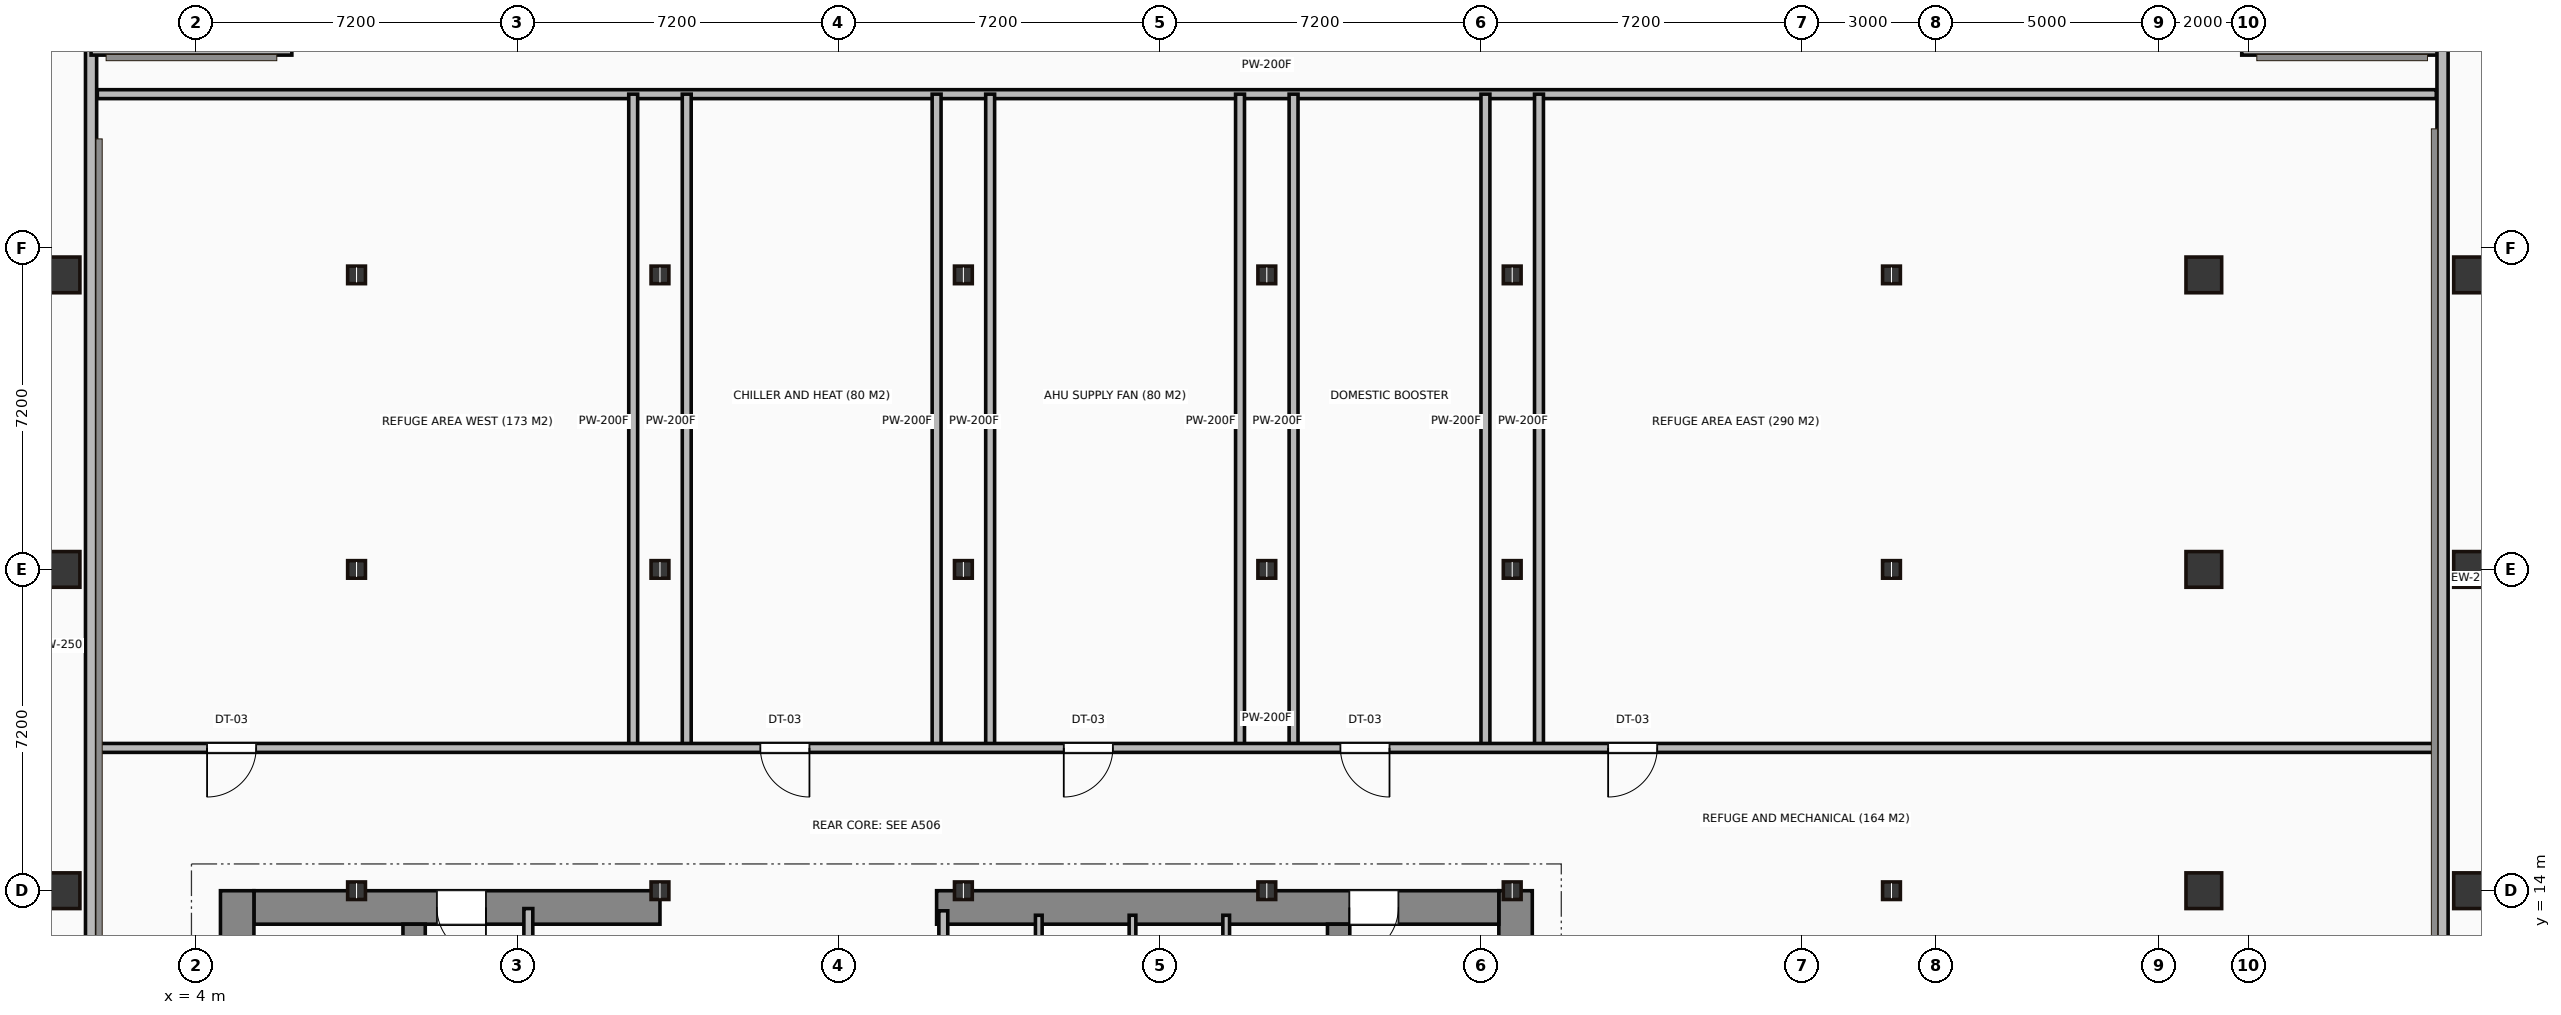
"""IFC4 building model, lengths in metres.
Left out: names, types, materials, properties, quantities, classifications, styles, units other than length and angle.
Written with IfcOpenShell. Run it as: python <this file> out.ifc"""

import sys

from ifc_helpers import new_model, si_unit, direction, frame, frame_2d, origin, origin_2d, place, context, subcontext, project, spatial, rectangle, hollow_rectangle, i_section, extrude, source, transform, mapped, element, fill, save


model = new_model("IFC4")
c1 = context("Model", 3, precision=1e-05, world=origin(), true_north=direction((0.0, 1.0)))
c2 = subcontext(c1, "Body", "Model", "MODEL_VIEW")
j1 = project(units=[si_unit("LENGTHUNIT", "METRE"), si_unit("PLANEANGLEUNIT", "RADIAN")], contexts=[c1])
p1 = place(None, origin())
s1 = spatial("IfcSite", under=j1, at=p1, CompositionType="ELEMENT")
p2 = place(p1, origin())
s2 = spatial("IfcBuilding", under=s1, at=p2, CompositionType="ELEMENT")
p3 = place(p2, frame((0.0, 0.0, 136.1)))
s3 = spatial("IfcBuildingStorey", under=s2, at=p3, CompositionType="ELEMENT", Elevation=136.1)
m1 = source(origin(), c2, "Body", "SweptSolid", [
    extrude(rectangle(XDim=13.1, YDim=0.75, at=frame_2d((6.55, 0.0))), origin(), (0.0, 0.0, 1.0), 4.5),
])
for number, where, z_axis, x_axis in (
    (1, (4.925, 0.9, 0.0), (0.0, 0.0, 1.0), (0.0, 1.0, 0.0)),
    (2, (33.575, 0.9, 0.0), (0.0, 0.0, 1.0), (0.0, 1.0, 0.0)),
):
    element("IfcWall", number, at=place(p3, frame(where, z_axis=z_axis, x_axis=x_axis)), inside=s3, PredefinedType="SHEAR", context=c2, shape_type="MappedRepresentation", body=[
        mapped(m1, transform((0.0, 0.0, 0.0))),
    ])
m2 = source(origin(), c2, "Body", "SweptSolid", [
    extrude(rectangle(XDim=9.1, YDim=0.75, at=frame_2d((4.55, 0.0))), origin(), (0.0, 0.0, 1.0), 4.5),
])
p4 = place(p3, frame((5.3, 13.625, 0.0), z_axis=(0.0, 0.0, 1.0), x_axis=(1.0, 0.0, 0.0)))
e3 = element("IfcWall", 3, at=p4, inside=s3, PredefinedType="SHEAR", context=c2, shape_type="MappedRepresentation", body=[
    mapped(m2, transform((0.0, 0.0, 0.0))),
])
p5 = place(p4, frame((4.1, 0.0, 0.0)))
e4 = element("IfcOpeningElement", 4, at=p5, cuts=e3, PredefinedType="OPENING", context=c2, shape_type="SweptSolid", body=[
    extrude(rectangle(XDim=1.1, YDim=2.15, at=frame_2d((0.55, 1.075))), frame((0.0, 0.385, 0.0), z_axis=(0.0, -1.0, 0.0), x_axis=(1.0, 0.0, 0.0)), (0.0, 0.0, 1.0), 0.77),
])
m3 = source(origin(), c2, "Body", "SweptSolid", [
    extrude(rectangle(XDim=12.6, YDim=0.75, at=frame_2d((6.3, 0.0))), origin(), (0.0, 0.0, 1.0), 4.5),
])
p6 = place(p3, frame((20.6, 13.625, 0.0), z_axis=(0.0, 0.0, 1.0), x_axis=(1.0, 0.0, 0.0)))
e5 = element("IfcWall", 5, at=p6, inside=s3, PredefinedType="SHEAR", context=c2, shape_type="MappedRepresentation", body=[
    mapped(m3, transform((0.0, 0.0, 0.0))),
])
p7 = place(p6, frame((9.25, 0.0, 0.0)))
e6 = element("IfcOpeningElement", 6, at=p7, cuts=e5, PredefinedType="OPENING", context=c2, shape_type="SweptSolid", body=[
    extrude(rectangle(XDim=1.1, YDim=2.15, at=frame_2d((0.55, 1.075))), frame((0.0, 0.385, 0.0), z_axis=(0.0, -1.0, 0.0), x_axis=(1.0, 0.0, 0.0)), (0.0, 0.0, 1.0), 0.77),
])
m4 = source(origin(), c2, "Body", "SweptSolid", [
    extrude(rectangle(XDim=12.35, YDim=0.5, at=frame_2d((6.175, 0.0))), origin(), (0.0, 0.0, 1.0), 4.5),
])
for number, where, z_axis, x_axis in (
    (7, (8.89, 0.9, 0.0), (0.0, 0.0, 1.0), (0.0, 1.0, 0.0)),
    (8, (29.61, 0.9, 0.0), (0.0, 0.0, 1.0), (0.0, 1.0, 0.0)),
):
    element("IfcWall", number, at=place(p3, frame(where, z_axis=z_axis, x_axis=x_axis)), inside=s3, PredefinedType="SHEAR", context=c2, shape_type="MappedRepresentation", body=[
        mapped(m4, transform((0.0, 0.0, 0.0))),
    ])
m5 = source(origin(), c2, "Body", "SweptSolid", [
    extrude(hollow_rectangle(XDim=0.8, YDim=0.8, WallThickness=0.04, at=origin_2d()), origin(), (0.0, 0.0, 1.0), 4.5),
])
for number, where, z_axis, x_axis in (
    (9, (1.0, 14.0, 0.0), (0.0, 0.0, 1.0), (1.0, 0.0, 0.0)),
    (10, (1.0, 21.2, 0.0), (0.0, 0.0, 1.0), (1.0, 0.0, 0.0)),
    (11, (1.0, 27.8, 0.0), (0.0, 0.0, 1.0), (1.0, 0.0, 0.0)),
):
    element("IfcColumn", number, at=place(p3, frame(where, z_axis=z_axis, x_axis=x_axis)), inside=s3, PredefinedType="COLUMN", context=c2, shape_type="MappedRepresentation", body=[
        mapped(m5, transform((0.0, 0.0, 0.0))),
    ])
m6 = source(origin(), c2, "Body", "SweptSolid", [
    extrude(i_section(OverallWidth=0.399, OverallDepth=0.393, WebThickness=0.023, FlangeThickness=0.037, at=origin_2d()), origin(), (0.0, 0.0, 1.0), 4.5),
])
for number, where, z_axis, x_axis in (
    (12, (7.6, 14.0, 0.0), (0.0, 0.0, 1.0), (1.0, 0.0, 0.0)),
    (13, (7.6, 21.2, 0.0), (0.0, 0.0, 1.0), (1.0, 0.0, 0.0)),
    (14, (7.6, 27.8, 0.0), (0.0, 0.0, 1.0), (1.0, 0.0, 0.0)),
    (15, (14.4, 14.0, 0.0), (0.0, 0.0, 1.0), (1.0, 0.0, 0.0)),
    (16, (14.4, 21.2, 0.0), (0.0, 0.0, 1.0), (1.0, 0.0, 0.0)),
    (17, (14.4, 27.8, 0.0), (0.0, 0.0, 1.0), (1.0, 0.0, 0.0)),
    (18, (21.2, 14.0, 0.0), (0.0, 0.0, 1.0), (1.0, 0.0, 0.0)),
    (19, (21.2, 21.2, 0.0), (0.0, 0.0, 1.0), (1.0, 0.0, 0.0)),
    (20, (21.2, 27.8, 0.0), (0.0, 0.0, 1.0), (1.0, 0.0, 0.0)),
    (21, (28.0, 14.0, 0.0), (0.0, 0.0, 1.0), (1.0, 0.0, 0.0)),
    (22, (28.0, 21.2, 0.0), (0.0, 0.0, 1.0), (1.0, 0.0, 0.0)),
    (23, (28.0, 27.8, 0.0), (0.0, 0.0, 1.0), (1.0, 0.0, 0.0)),
    (24, (33.5, 14.0, 0.0), (0.0, 0.0, 1.0), (1.0, 0.0, 0.0)),
    (25, (33.5, 21.2, 0.0), (0.0, 0.0, 1.0), (1.0, 0.0, 0.0)),
    (26, (33.5, 27.8, 0.0), (0.0, 0.0, 1.0), (1.0, 0.0, 0.0)),
    (27, (42.0, 14.0, 0.0), (0.0, 0.0, 1.0), (1.0, 0.0, 0.0)),
    (28, (42.0, 21.2, 0.0), (0.0, 0.0, 1.0), (1.0, 0.0, 0.0)),
    (29, (42.0, 27.8, 0.0), (0.0, 0.0, 1.0), (1.0, 0.0, 0.0)),
):
    element("IfcColumn", number, at=place(p3, frame(where, z_axis=z_axis, x_axis=x_axis)), inside=s3, PredefinedType="COLUMN", context=c2, shape_type="MappedRepresentation", body=[
        mapped(m6, transform((0.0, 0.0, 0.0))),
    ])
for number, where, z_axis, x_axis in (
    (30, (49.0, 14.0, 0.0), (0.0, 0.0, 1.0), (1.0, 0.0, 0.0)),
    (31, (49.0, 21.2, 0.0), (0.0, 0.0, 1.0), (1.0, 0.0, 0.0)),
    (32, (49.0, 27.8, 0.0), (0.0, 0.0, 1.0), (1.0, 0.0, 0.0)),
    (33, (55.0, 14.0, 0.0), (0.0, 0.0, 1.0), (1.0, 0.0, 0.0)),
    (34, (55.0, 21.2, 0.0), (0.0, 0.0, 1.0), (1.0, 0.0, 0.0)),
    (35, (55.0, 27.8, 0.0), (0.0, 0.0, 1.0), (1.0, 0.0, 0.0)),
):
    element("IfcColumn", number, at=place(p3, frame(where, z_axis=z_axis, x_axis=x_axis)), inside=s3, PredefinedType="COLUMN", context=c2, shape_type="MappedRepresentation", body=[
        mapped(m5, transform((0.0, 0.0, 0.0))),
    ])
m7 = source(origin(), c2, "Body", "SweptSolid", [
    extrude(rectangle(XDim=26.7, YDim=0.25, at=frame_2d((13.35, 0.0))), origin(), (0.0, 0.0, 1.0), 4.25),
])
p8 = place(p3, frame((1.65, 6.15, 0.0), z_axis=(0.0, 0.0, 1.0), x_axis=(0.0, 1.0, 0.0)))
e36 = element("IfcWall", 36, at=p8, inside=s3, PredefinedType="STANDARD", context=c2, shape_type="MappedRepresentation", body=[
    mapped(m7, transform((0.0, 0.0, 0.0))),
])
m8 = source(origin(), c2, "Body", "SweptSolid", [
    extrude(rectangle(XDim=4.5, YDim=0.25, at=frame_2d((2.25, 0.0))), origin(), (0.0, 0.0, 1.0), 4.25),
])
for number, where, z_axis, x_axis in (
    (37, (1.65, 32.85, 0.0), (0.0, 0.0, 1.0), (1.0, 0.0, 0.0)),
    (38, (49.85, 32.85, 0.0), (0.0, 0.0, 1.0), (1.0, 0.0, 0.0)),
):
    element("IfcWall", number, at=place(p3, frame(where, z_axis=z_axis, x_axis=x_axis)), inside=s3, PredefinedType="STANDARD", context=c2, shape_type="MappedRepresentation", body=[
        mapped(m8, transform((0.0, 0.0, 0.0))),
    ])
m9 = source(origin(), c2, "Body", "SweptSolid", [
    extrude(rectangle(XDim=23.7, YDim=0.25, at=frame_2d((11.85, 0.0))), origin(), (0.0, 0.0, 1.0), 4.25),
])
p9 = place(p3, frame((54.35, 32.85, 0.0), z_axis=(0.0, 0.0, 1.0), x_axis=(0.0, -1.0, 0.0)))
e39 = element("IfcWall", 39, at=p9, inside=s3, PredefinedType="STANDARD", context=c2, shape_type="MappedRepresentation", body=[
    mapped(m9, transform((0.0, 0.0, 0.0))),
])
m10 = source(origin(), c2, "Body", "SweptSolid", [
    extrude(rectangle(XDim=3.18, YDim=0.2, at=frame_2d((1.59, 0.0))), origin(), (0.0, 0.0, 1.0), 4.25),
])
p10 = place(p3, frame((11.45, 10.42, 0.0), z_axis=(0.0, 0.0, 1.0), x_axis=(0.0, 1.0, 0.0)))
e40 = element("IfcWall", 40, at=p10, inside=s3, PredefinedType="PARTITIONING", context=c2, shape_type="MappedRepresentation", body=[
    mapped(m10, transform((0.0, 0.0, 0.0))),
])
m11 = source(origin(), c2, "Body", "SweptSolid", [
    extrude(rectangle(XDim=3.0, YDim=0.2, at=frame_2d((1.5, 0.0))), origin(), (0.0, 0.0, 1.0), 4.25),
])
p11 = place(p3, frame((20.75, 10.55, 0.0), z_axis=(0.0, 0.0, 1.0), x_axis=(0.0, 1.0, 0.0)))
e41 = element("IfcWall", 41, at=p11, inside=s3, PredefinedType="PARTITIONING", context=c2, shape_type="MappedRepresentation", body=[
    mapped(m11, transform((0.0, 0.0, 0.0))),
])
m12 = source(origin(), c2, "Body", "SweptSolid", [
    extrude(rectangle(XDim=2.85, YDim=0.15, at=frame_2d((1.425, 0.0))), origin(), (0.0, 0.0, 1.0), 4.25),
])
for number, where, z_axis, x_axis in (
    (42, (22.89, 10.6, 0.0), (0.0, 0.0, 1.0), (0.0, 1.0, 0.0)),
    (43, (24.99, 10.6, 0.0), (0.0, 0.0, 1.0), (0.0, 1.0, 0.0)),
    (44, (27.09, 10.6, 0.0), (0.0, 0.0, 1.0), (0.0, 1.0, 0.0)),
):
    element("IfcWall", number, at=place(p3, frame(where, z_axis=z_axis, x_axis=x_axis)), inside=s3, PredefinedType="PARTITIONING", context=c2, shape_type="MappedRepresentation", body=[
        mapped(m12, transform((0.0, 0.0, 0.0))),
    ])
m13 = source(origin(), c2, "Body", "SweptSolid", [
    extrude(rectangle(XDim=52.42, YDim=0.2, at=frame_2d((26.21, 0.0))), origin(), (0.0, 0.0, 1.0), 4.25),
])
p12 = place(p3, frame((1.79, 17.2, 0.0), z_axis=(0.0, 0.0, 1.0), x_axis=(1.0, 0.0, 0.0)))
e45 = element("IfcWall", 45, at=p12, inside=s3, PredefinedType="PARTITIONING", context=c2, shape_type="MappedRepresentation", body=[
    mapped(m13, transform((0.0, 0.0, 0.0))),
])
p13 = place(p12, frame((2.46, 0.0, 0.0)))
e46 = element("IfcOpeningElement", 46, at=p13, cuts=e45, PredefinedType="OPENING", context=c2, shape_type="SweptSolid", body=[
    extrude(rectangle(XDim=1.1, YDim=2.15, at=frame_2d((0.55, 1.075))), frame((0.0, 0.11, 0.0), z_axis=(0.0, -1.0, 0.0), x_axis=(1.0, 0.0, 0.0)), (0.0, 0.0, 1.0), 0.22),
])
p14 = place(p12, frame((14.86, 0.0, 0.0)))
e47 = element("IfcOpeningElement", 47, at=p14, cuts=e45, PredefinedType="OPENING", context=c2, shape_type="SweptSolid", body=[
    extrude(rectangle(XDim=1.1, YDim=2.15, at=frame_2d((0.55, 1.075))), frame((0.0, 0.11, 0.0), z_axis=(0.0, -1.0, 0.0), x_axis=(1.0, 0.0, 0.0)), (0.0, 0.0, 1.0), 0.22),
])
p15 = place(p12, frame((21.66, 0.0, 0.0)))
e48 = element("IfcOpeningElement", 48, at=p15, cuts=e45, PredefinedType="OPENING", context=c2, shape_type="SweptSolid", body=[
    extrude(rectangle(XDim=1.1, YDim=2.15, at=frame_2d((0.55, 1.075))), frame((0.0, 0.11, 0.0), z_axis=(0.0, -1.0, 0.0), x_axis=(1.0, 0.0, 0.0)), (0.0, 0.0, 1.0), 0.22),
])
p16 = place(p12, frame((27.86, 0.0, 0.0)))
e49 = element("IfcOpeningElement", 49, at=p16, cuts=e45, PredefinedType="OPENING", context=c2, shape_type="SweptSolid", body=[
    extrude(rectangle(XDim=1.1, YDim=2.15, at=frame_2d((0.55, 1.075))), frame((0.0, 0.11, 0.0), z_axis=(0.0, -1.0, 0.0), x_axis=(1.0, 0.0, 0.0)), (0.0, 0.0, 1.0), 0.22),
])
p17 = place(p12, frame((33.86, 0.0, 0.0)))
e50 = element("IfcOpeningElement", 50, at=p17, cuts=e45, PredefinedType="OPENING", context=c2, shape_type="SweptSolid", body=[
    extrude(rectangle(XDim=1.1, YDim=2.15, at=frame_2d((0.55, 1.075))), frame((0.0, 0.11, 0.0), z_axis=(0.0, -1.0, 0.0), x_axis=(1.0, 0.0, 0.0)), (0.0, 0.0, 1.0), 0.22),
])
p18 = place(p3, frame((1.79, 31.85, 0.0), z_axis=(0.0, 0.0, 1.0), x_axis=(1.0, 0.0, 0.0)))
e51 = element("IfcWall", 51, at=p18, inside=s3, PredefinedType="PARTITIONING", context=c2, shape_type="MappedRepresentation", body=[
    mapped(m13, transform((0.0, 0.0, 0.0))),
])
m14 = source(origin(), c2, "Body", "SweptSolid", [
    extrude(rectangle(XDim=14.65, YDim=0.2, at=frame_2d((7.325, 0.0))), origin(), (0.0, 0.0, 1.0), 4.25),
])
for number, where, z_axis, x_axis in (
    (52, (13.8, 17.2, 0.0), (0.0, 0.0, 1.0), (0.0, 1.0, 0.0)),
    (53, (15.0, 17.2, 0.0), (0.0, 0.0, 1.0), (0.0, 1.0, 0.0)),
    (54, (20.6, 17.2, 0.0), (0.0, 0.0, 1.0), (0.0, 1.0, 0.0)),
    (55, (21.8, 17.2, 0.0), (0.0, 0.0, 1.0), (0.0, 1.0, 0.0)),
    (56, (27.4, 17.2, 0.0), (0.0, 0.0, 1.0), (0.0, 1.0, 0.0)),
    (57, (28.6, 17.2, 0.0), (0.0, 0.0, 1.0), (0.0, 1.0, 0.0)),
    (58, (32.9, 17.2, 0.0), (0.0, 0.0, 1.0), (0.0, 1.0, 0.0)),
    (59, (34.1, 17.2, 0.0), (0.0, 0.0, 1.0), (0.0, 1.0, 0.0)),
):
    element("IfcWall", number, at=place(p3, frame(where, z_axis=z_axis, x_axis=x_axis)), inside=s3, PredefinedType="PARTITIONING", context=c2, shape_type="MappedRepresentation", body=[
        mapped(m14, transform((0.0, 0.0, 0.0))),
    ])
m15 = source(origin(), c2, "Body", "SweptSolid", [
    extrude(rectangle(XDim=1.1, YDim=2.15, at=frame_2d((0.55, 1.075))), frame((0.0, 0.025, 0.0), z_axis=(0.0, -1.0, 0.0), x_axis=(1.0, 0.0, 0.0)), (0.0, 0.0, 1.0), 0.05),
])
p19 = place(p5, origin())
e60 = element("IfcDoor", 60, at=p19, inside=s3, OperationType="SINGLE_SWING_RIGHT", PredefinedType="DOOR", context=c2, shape_type="MappedRepresentation", body=[
    mapped(m15, transform((0.0, 0.0, 0.0))),
])
fill(e4, e60)
p20 = place(p7, origin())
e61 = element("IfcDoor", 61, at=p20, inside=s3, OperationType="SINGLE_SWING_LEFT", PredefinedType="DOOR", context=c2, shape_type="MappedRepresentation", body=[
    mapped(m15, transform((0.0, 0.0, 0.0))),
])
fill(e6, e61)
p21 = place(p13, origin())
e62 = element("IfcDoor", 62, at=p21, inside=s3, OperationType="SINGLE_SWING_LEFT", PredefinedType="DOOR", context=c2, shape_type="MappedRepresentation", body=[
    mapped(m15, transform((0.0, 0.0, 0.0))),
])
fill(e46, e62)
p22 = place(p14, origin())
e63 = element("IfcDoor", 63, at=p22, inside=s3, OperationType="SINGLE_SWING_RIGHT", PredefinedType="DOOR", context=c2, shape_type="MappedRepresentation", body=[
    mapped(m15, transform((0.0, 0.0, 0.0))),
])
fill(e47, e63)
p23 = place(p15, origin())
e64 = element("IfcDoor", 64, at=p23, inside=s3, OperationType="SINGLE_SWING_LEFT", PredefinedType="DOOR", context=c2, shape_type="MappedRepresentation", body=[
    mapped(m15, transform((0.0, 0.0, 0.0))),
])
fill(e48, e64)
p24 = place(p16, origin())
e65 = element("IfcDoor", 65, at=p24, inside=s3, OperationType="SINGLE_SWING_RIGHT", PredefinedType="DOOR", context=c2, shape_type="MappedRepresentation", body=[
    mapped(m15, transform((0.0, 0.0, 0.0))),
])
fill(e49, e65)
p25 = place(p17, origin())
e66 = element("IfcDoor", 66, at=p25, inside=s3, OperationType="SINGLE_SWING_LEFT", PredefinedType="DOOR", context=c2, shape_type="MappedRepresentation", body=[
    mapped(m15, transform((0.0, 0.0, 0.0))),
])
fill(e50, e66)
save(model, sys.argv[1])
